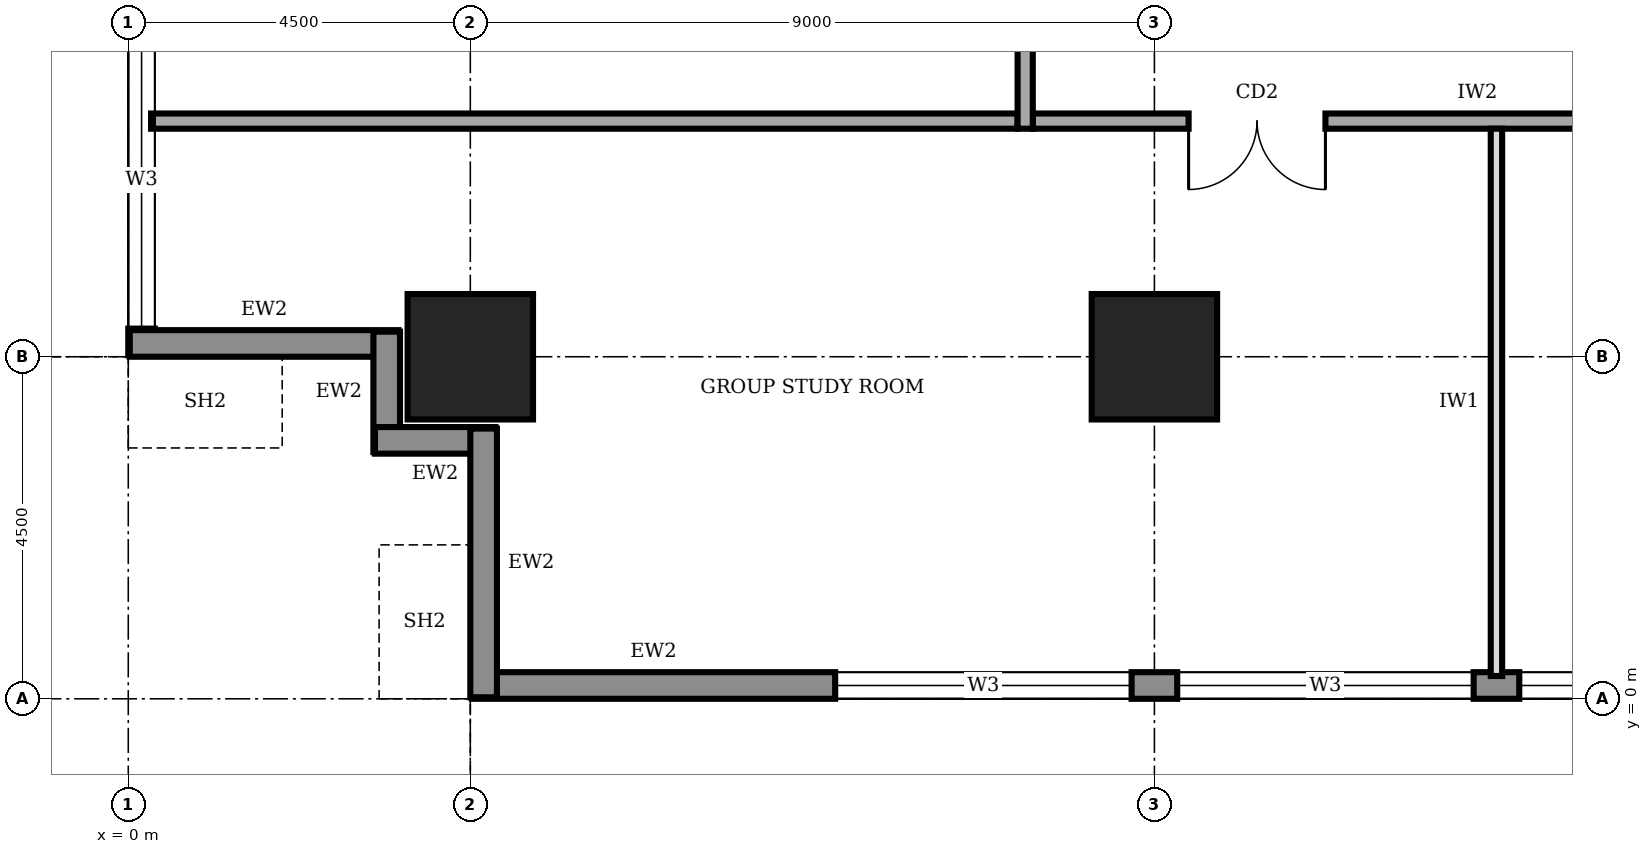
"""IFC4 building model, lengths in metres.
Left out: names, types, materials, properties, quantities, classifications, styles, units other than length and angle.
Written with IfcOpenShell. Run it as: python <this file> out.ifc"""

import sys

from ifc_helpers import new_model, si_unit, direction, frame, frame_2d, origin, origin_2d, place, context, subcontext, project, spatial, rectangle, extrude, element, fill, save


model = new_model("IFC4")
c1 = context("Model", 3, precision=1e-05, world=origin(), true_north=direction((0.0, 1.0)))
c2 = subcontext(c1, "Body", "Model", "MODEL_VIEW")
j1 = project(units=[si_unit("LENGTHUNIT", "METRE"), si_unit("PLANEANGLEUNIT", "RADIAN")], contexts=[c1])
p1 = place(None, origin())
s1 = spatial("IfcSite", under=j1, at=p1, CompositionType="ELEMENT")
p2 = place(p1, origin())
s2 = spatial("IfcBuilding", under=s1, at=p2, CompositionType="ELEMENT")
p3 = place(p2, frame((0.0, 0.0, 197.0)))
s3 = spatial("IfcBuildingStorey", under=s2, at=p3, CompositionType="ELEMENT", Elevation=197.0)
for number, where, z_axis, x_axis in (
    (1, (4.5, 4.5, 0.0), (0.0, 0.0, 1.0), (1.0, 0.0, 0.0)),
    (2, (13.5, 4.5, 0.0), (0.0, 0.0, 1.0), (1.0, 0.0, 0.0)),
):
    element("IfcColumn", number, at=place(p3, frame(where, z_axis=z_axis, x_axis=x_axis)), inside=s3, PredefinedType="COLUMN", context=c2, shape_type="SweptSolid", body=[
        extrude(rectangle(XDim=1.65, YDim=1.65, at=origin_2d()), origin(), (0.0, 0.0, 1.0), 4.0),
    ])
p4 = place(p3, frame((4.52, 0.175, 0.0), z_axis=(0.0, 0.0, 1.0), x_axis=(1.0, 0.0, 0.0)))
e3 = element("IfcWall", 3, at=p4, inside=s3, PredefinedType="STANDARD", context=c2, shape_type="SweptSolid", body=[
    extrude(rectangle(XDim=31.46, YDim=0.35, at=frame_2d((15.73, 0.0))), origin(), (0.0, 0.0, 1.0), 3.75),
])
p5 = place(p4, frame((4.78, 0.0, 0.95)))
e4 = element("IfcOpeningElement", 4, at=p5, cuts=e3, PredefinedType="OPENING", context=c2, shape_type="SweptSolid", body=[
    extrude(rectangle(XDim=3.9, YDim=1.8, at=frame_2d((1.95, 0.9))), frame((0.0, 0.185, 0.0), z_axis=(0.0, -1.0, 0.0), x_axis=(1.0, 0.0, 0.0)), (0.0, 0.0, 1.0), 0.37),
])
p6 = place(p4, frame((9.28, 0.0, 0.95)))
e5 = element("IfcOpeningElement", 5, at=p6, cuts=e3, PredefinedType="OPENING", context=c2, shape_type="SweptSolid", body=[
    extrude(rectangle(XDim=3.9, YDim=1.8, at=frame_2d((1.95, 0.9))), frame((0.0, 0.185, 0.0), z_axis=(0.0, -1.0, 0.0), x_axis=(1.0, 0.0, 0.0)), (0.0, 0.0, 1.0), 0.37),
])
p7 = place(p4, frame((13.78, 0.0, 0.95)))
e6 = element("IfcOpeningElement", 6, at=p7, cuts=e3, PredefinedType="OPENING", context=c2, shape_type="SweptSolid", body=[
    extrude(rectangle(XDim=3.9, YDim=1.8, at=frame_2d((1.95, 0.9))), frame((0.0, 0.185, 0.0), z_axis=(0.0, -1.0, 0.0), x_axis=(1.0, 0.0, 0.0)), (0.0, 0.0, 1.0), 0.37),
])
p8 = place(p4, frame((18.28, 0.0, 0.95)))
e7 = element("IfcOpeningElement", 7, at=p8, cuts=e3, PredefinedType="OPENING", context=c2, shape_type="SweptSolid", body=[
    extrude(rectangle(XDim=3.9, YDim=1.8, at=frame_2d((1.95, 0.9))), frame((0.0, 0.185, 0.0), z_axis=(0.0, -1.0, 0.0), x_axis=(1.0, 0.0, 0.0)), (0.0, 0.0, 1.0), 0.37),
])
p9 = place(p4, frame((22.78, 0.0, 0.95)))
e8 = element("IfcOpeningElement", 8, at=p9, cuts=e3, PredefinedType="OPENING", context=c2, shape_type="SweptSolid", body=[
    extrude(rectangle(XDim=3.9, YDim=1.8, at=frame_2d((1.95, 0.9))), frame((0.0, 0.185, 0.0), z_axis=(0.0, -1.0, 0.0), x_axis=(1.0, 0.0, 0.0)), (0.0, 0.0, 1.0), 0.37),
])
p10 = place(p4, frame((27.21, 0.0, 0.95)))
e9 = element("IfcOpeningElement", 9, at=p10, cuts=e3, PredefinedType="OPENING", context=c2, shape_type="SweptSolid", body=[
    extrude(rectangle(XDim=3.9, YDim=1.8, at=frame_2d((1.95, 0.9))), frame((0.0, 0.185, 0.0), z_axis=(0.0, -1.0, 0.0), x_axis=(1.0, 0.0, 0.0)), (0.0, 0.0, 1.0), 0.37),
])
p11 = place(p3, frame((0.175, 35.98, 0.0), z_axis=(0.0, 0.0, 1.0), x_axis=(0.0, -1.0, 0.0)))
e10 = element("IfcWall", 10, at=p11, inside=s3, PredefinedType="STANDARD", context=c2, shape_type="SweptSolid", body=[
    extrude(rectangle(XDim=31.46, YDim=0.35, at=frame_2d((15.73, 0.0))), origin(), (0.0, 0.0, 1.0), 3.75),
])
p12 = place(p11, frame((27.21, 0.0, 0.95)))
e11 = element("IfcOpeningElement", 11, at=p12, cuts=e10, PredefinedType="OPENING", context=c2, shape_type="SweptSolid", body=[
    extrude(rectangle(XDim=3.9, YDim=1.8, at=frame_2d((1.95, 0.9))), frame((0.0, 0.185, 0.0), z_axis=(0.0, -1.0, 0.0), x_axis=(1.0, 0.0, 0.0)), (0.0, 0.0, 1.0), 0.37),
])
p13 = place(p11, frame((22.78, 0.0, 0.95)))
e12 = element("IfcOpeningElement", 12, at=p13, cuts=e10, PredefinedType="OPENING", context=c2, shape_type="SweptSolid", body=[
    extrude(rectangle(XDim=3.9, YDim=1.8, at=frame_2d((1.95, 0.9))), frame((0.0, 0.185, 0.0), z_axis=(0.0, -1.0, 0.0), x_axis=(1.0, 0.0, 0.0)), (0.0, 0.0, 1.0), 0.37),
])
p14 = place(p11, frame((18.28, 0.0, 0.95)))
e13 = element("IfcOpeningElement", 13, at=p14, cuts=e10, PredefinedType="OPENING", context=c2, shape_type="SweptSolid", body=[
    extrude(rectangle(XDim=3.9, YDim=1.8, at=frame_2d((1.95, 0.9))), frame((0.0, 0.185, 0.0), z_axis=(0.0, -1.0, 0.0), x_axis=(1.0, 0.0, 0.0)), (0.0, 0.0, 1.0), 0.37),
])
p15 = place(p11, frame((13.78, 0.0, 0.95)))
e14 = element("IfcOpeningElement", 14, at=p15, cuts=e10, PredefinedType="OPENING", context=c2, shape_type="SweptSolid", body=[
    extrude(rectangle(XDim=3.9, YDim=1.8, at=frame_2d((1.95, 0.9))), frame((0.0, 0.185, 0.0), z_axis=(0.0, -1.0, 0.0), x_axis=(1.0, 0.0, 0.0)), (0.0, 0.0, 1.0), 0.37),
])
p16 = place(p11, frame((9.28, 0.0, 0.95)))
e15 = element("IfcOpeningElement", 15, at=p16, cuts=e10, PredefinedType="OPENING", context=c2, shape_type="SweptSolid", body=[
    extrude(rectangle(XDim=3.9, YDim=1.8, at=frame_2d((1.95, 0.9))), frame((0.0, 0.185, 0.0), z_axis=(0.0, -1.0, 0.0), x_axis=(1.0, 0.0, 0.0)), (0.0, 0.0, 1.0), 0.37),
])
p17 = place(p11, frame((4.78, 0.0, 0.95)))
e16 = element("IfcOpeningElement", 16, at=p17, cuts=e10, PredefinedType="OPENING", context=c2, shape_type="SweptSolid", body=[
    extrude(rectangle(XDim=3.9, YDim=1.8, at=frame_2d((1.95, 0.9))), frame((0.0, 0.185, 0.0), z_axis=(0.0, -1.0, 0.0), x_axis=(1.0, 0.0, 0.0)), (0.0, 0.0, 1.0), 0.37),
])
p18 = place(p3, frame((0.02, 4.675, 0.0), z_axis=(0.0, 0.0, 1.0), x_axis=(1.0, 0.0, 0.0)))
e17 = element("IfcWall", 17, at=p18, inside=s3, PredefinedType="STANDARD", context=c2, shape_type="SweptSolid", body=[
    extrude(rectangle(XDim=3.535, YDim=0.35, at=frame_2d((1.768, 0.0))), origin(), (0.0, 0.0, 1.0), 2.85),
])
for number, where, z_axis, x_axis in (
    (18, (3.4, 4.83, 0.0), (0.0, 0.0, 1.0), (0.0, -1.0, 0.0)),
    (19, (3.245, 3.4, 0.0), (0.0, 0.0, 1.0), (1.0, 0.0, 0.0)),
):
    element("IfcWall", number, at=place(p3, frame(where, z_axis=z_axis, x_axis=x_axis)), inside=s3, PredefinedType="STANDARD", context=c2, shape_type="SweptSolid", body=[
        extrude(rectangle(XDim=1.585, YDim=0.35, at=frame_2d((0.792, 0.0))), origin(), (0.0, 0.0, 1.0), 3.75),
    ])
p19 = place(p3, frame((4.675, 3.555, 0.0), z_axis=(0.0, 0.0, 1.0), x_axis=(0.0, -1.0, 0.0)))
e20 = element("IfcWall", 20, at=p19, inside=s3, PredefinedType="STANDARD", context=c2, shape_type="SweptSolid", body=[
    extrude(rectangle(XDim=3.535, YDim=0.35, at=frame_2d((1.768, 0.0))), origin(), (0.0, 0.0, 1.0), 2.85),
])
p20 = place(p3, frame((11.9, 7.6, 0.0), z_axis=(0.0, 0.0, 1.0), x_axis=(1.0, 0.0, 0.0)))
e21 = element("IfcWall", 21, at=p20, inside=s3, PredefinedType="SOLIDWALL", context=c2, shape_type="SweptSolid", body=[
    extrude(rectangle(XDim=16.9, YDim=0.2, at=frame_2d((8.45, 0.0))), origin(), (0.0, 0.0, 1.0), 3.75),
])
p21 = place(p20, frame((2.05, 0.0, 0.0)))
e22 = element("IfcOpeningElement", 22, at=p21, cuts=e21, PredefinedType="OPENING", context=c2, shape_type="SweptSolid", body=[
    extrude(rectangle(XDim=1.8, YDim=2.1, at=frame_2d((0.9, 1.05))), frame((0.0, 0.11, 0.0), z_axis=(0.0, -1.0, 0.0), x_axis=(1.0, 0.0, 0.0)), (0.0, 0.0, 1.0), 0.22),
])
p22 = place(p20, frame((7.85, 0.0, 0.0)))
e23 = element("IfcOpeningElement", 23, at=p22, cuts=e21, PredefinedType="OPENING", context=c2, shape_type="SweptSolid", body=[
    extrude(rectangle(XDim=1.0, YDim=2.1, at=frame_2d((0.5, 1.05))), frame((0.0, 0.11, 0.0), z_axis=(0.0, -1.0, 0.0), x_axis=(1.0, 0.0, 0.0)), (0.0, 0.0, 1.0), 0.22),
])
p23 = place(p20, frame((12.85, 0.0, 0.0)))
e24 = element("IfcOpeningElement", 24, at=p23, cuts=e21, PredefinedType="OPENING", context=c2, shape_type="SweptSolid", body=[
    extrude(rectangle(XDim=1.8, YDim=2.1, at=frame_2d((0.9, 1.05))), frame((0.0, 0.11, 0.0), z_axis=(0.0, -1.0, 0.0), x_axis=(1.0, 0.0, 0.0)), (0.0, 0.0, 1.0), 0.22),
])
p24 = place(p3, frame((11.8, 32.8, 0.0), z_axis=(0.0, 0.0, 1.0), x_axis=(0.0, -1.0, 0.0)))
e25 = element("IfcWall", 25, at=p24, inside=s3, PredefinedType="SOLIDWALL", context=c2, shape_type="SweptSolid", body=[
    extrude(rectangle(XDim=25.3, YDim=0.2, at=frame_2d((12.65, 0.0))), origin(), (0.0, 0.0, 1.0), 3.75),
])
p25 = place(p24, frame((21.8, 0.0, 0.0)))
e26 = element("IfcOpeningElement", 26, at=p25, cuts=e25, PredefinedType="OPENING", context=c2, shape_type="SweptSolid", body=[
    extrude(rectangle(XDim=1.0, YDim=2.1, at=frame_2d((0.5, 1.05))), frame((0.0, 0.11, 0.0), z_axis=(0.0, -1.0, 0.0), x_axis=(1.0, 0.0, 0.0)), (0.0, 0.0, 1.0), 0.22),
])
p26 = place(p24, frame((17.7, 0.0, 0.0)))
e27 = element("IfcOpeningElement", 27, at=p26, cuts=e25, PredefinedType="OPENING", context=c2, shape_type="SweptSolid", body=[
    extrude(rectangle(XDim=1.0, YDim=2.1, at=frame_2d((0.5, 1.05))), frame((0.0, 0.11, 0.0), z_axis=(0.0, -1.0, 0.0), x_axis=(1.0, 0.0, 0.0)), (0.0, 0.0, 1.0), 0.22),
])
p27 = place(p24, frame((14.7, 0.0, 0.0)))
e28 = element("IfcOpeningElement", 28, at=p27, cuts=e25, PredefinedType="OPENING", context=c2, shape_type="SweptSolid", body=[
    extrude(rectangle(XDim=0.9, YDim=2.1, at=frame_2d((0.45, 1.05))), frame((0.0, 0.11, 0.0), z_axis=(0.0, -1.0, 0.0), x_axis=(1.0, 0.0, 0.0)), (0.0, 0.0, 1.0), 0.22),
])
p28 = place(p24, frame((11.65, 0.0, 0.0)))
e29 = element("IfcOpeningElement", 29, at=p28, cuts=e25, PredefinedType="OPENING", context=c2, shape_type="SweptSolid", body=[
    extrude(rectangle(XDim=0.9, YDim=2.1, at=frame_2d((0.45, 1.05))), frame((0.0, 0.11, 0.0), z_axis=(0.0, -1.0, 0.0), x_axis=(1.0, 0.0, 0.0)), (0.0, 0.0, 1.0), 0.22),
])
p29 = place(p24, frame((6.95, 0.0, 0.0)))
e30 = element("IfcOpeningElement", 30, at=p29, cuts=e25, PredefinedType="OPENING", context=c2, shape_type="SweptSolid", body=[
    extrude(rectangle(XDim=0.9, YDim=2.1, at=frame_2d((0.45, 1.05))), frame((0.0, 0.11, 0.0), z_axis=(0.0, -1.0, 0.0), x_axis=(1.0, 0.0, 0.0)), (0.0, 0.0, 1.0), 0.22),
])
p30 = place(p24, frame((9.5, 0.0, 0.0)))
e31 = element("IfcOpeningElement", 31, at=p30, cuts=e25, PredefinedType="OPENING", context=c2, shape_type="SweptSolid", body=[
    extrude(rectangle(XDim=1.0, YDim=2.1, at=frame_2d((0.5, 1.05))), frame((0.0, 0.11, 0.0), z_axis=(0.0, -1.0, 0.0), x_axis=(1.0, 0.0, 0.0)), (0.0, 0.0, 1.0), 0.22),
])
p31 = place(p24, frame((2.3, 0.0, 0.0)))
e32 = element("IfcOpeningElement", 32, at=p31, cuts=e25, PredefinedType="OPENING", context=c2, shape_type="SweptSolid", body=[
    extrude(rectangle(XDim=1.0, YDim=2.1, at=frame_2d((0.5, 1.05))), frame((0.0, 0.11, 0.0), z_axis=(0.0, -1.0, 0.0), x_axis=(1.0, 0.0, 0.0)), (0.0, 0.0, 1.0), 0.22),
])
p32 = place(p3, frame((0.3, 7.6, 0.0), z_axis=(0.0, 0.0, 1.0), x_axis=(1.0, 0.0, 0.0)))
e33 = element("IfcWall", 33, at=p32, inside=s3, PredefinedType="SOLIDWALL", context=c2, shape_type="SweptSolid", body=[
    extrude(rectangle(XDim=11.4, YDim=0.2, at=frame_2d((5.7, 0.0))), origin(), (0.0, 0.0, 1.0), 3.75),
])
p33 = place(p3, frame((18.0, 0.3, 0.0), z_axis=(0.0, 0.0, 1.0), x_axis=(0.0, 1.0, 0.0)))
e34 = element("IfcWall", 34, at=p33, inside=s3, PredefinedType="PARTITIONING", context=c2, shape_type="SweptSolid", body=[
    extrude(rectangle(XDim=7.2, YDim=0.15, at=frame_2d((3.6, 0.0))), origin(), (0.0, 0.0, 1.0), 3.75),
])
p34 = place(p5, origin())
e35 = element("IfcWindow", 35, at=p34, inside=s3, PartitioningType="SINGLE_PANEL", PredefinedType="WINDOW", context=c2, shape_type="SweptSolid", body=[
    extrude(rectangle(XDim=3.9, YDim=1.8, at=frame_2d((1.95, 0.9))), frame((0.0, 0.03, 0.0), z_axis=(0.0, -1.0, 0.0), x_axis=(1.0, 0.0, 0.0)), (0.0, 0.0, 1.0), 0.06),
])
fill(e4, e35)
p35 = place(p6, origin())
e36 = element("IfcWindow", 36, at=p35, inside=s3, PartitioningType="SINGLE_PANEL", PredefinedType="WINDOW", context=c2, shape_type="SweptSolid", body=[
    extrude(rectangle(XDim=3.9, YDim=1.8, at=frame_2d((1.95, 0.9))), frame((0.0, 0.03, 0.0), z_axis=(0.0, -1.0, 0.0), x_axis=(1.0, 0.0, 0.0)), (0.0, 0.0, 1.0), 0.06),
])
fill(e5, e36)
p36 = place(p7, origin())
e37 = element("IfcWindow", 37, at=p36, inside=s3, PartitioningType="SINGLE_PANEL", PredefinedType="WINDOW", context=c2, shape_type="SweptSolid", body=[
    extrude(rectangle(XDim=3.9, YDim=1.8, at=frame_2d((1.95, 0.9))), frame((0.0, 0.03, 0.0), z_axis=(0.0, -1.0, 0.0), x_axis=(1.0, 0.0, 0.0)), (0.0, 0.0, 1.0), 0.06),
])
fill(e6, e37)
p37 = place(p12, origin())
e38 = element("IfcWindow", 38, at=p37, inside=s3, PartitioningType="SINGLE_PANEL", PredefinedType="WINDOW", context=c2, shape_type="SweptSolid", body=[
    extrude(rectangle(XDim=3.9, YDim=1.8, at=frame_2d((1.95, 0.9))), frame((0.0, 0.03, 0.0), z_axis=(0.0, -1.0, 0.0), x_axis=(1.0, 0.0, 0.0)), (0.0, 0.0, 1.0), 0.06),
])
fill(e11, e38)
p38 = place(p21, frame((1.8, 0.0, 0.0), z_axis=(0.0, 0.0, 1.0), x_axis=(-1.0, 0.0, 0.0)))
e39 = element("IfcDoor", 39, at=p38, inside=s3, OperationType="DOUBLE_DOOR_SINGLE_SWING", PredefinedType="DOOR", context=c2, shape_type="SweptSolid", body=[
    extrude(rectangle(XDim=1.8, YDim=2.1, at=frame_2d((0.9, 1.05))), frame((0.0, 0.025, 0.0), z_axis=(0.0, -1.0, 0.0), x_axis=(1.0, 0.0, 0.0)), (0.0, 0.0, 1.0), 0.05),
])
fill(e22, e39)
save(model, sys.argv[1])
